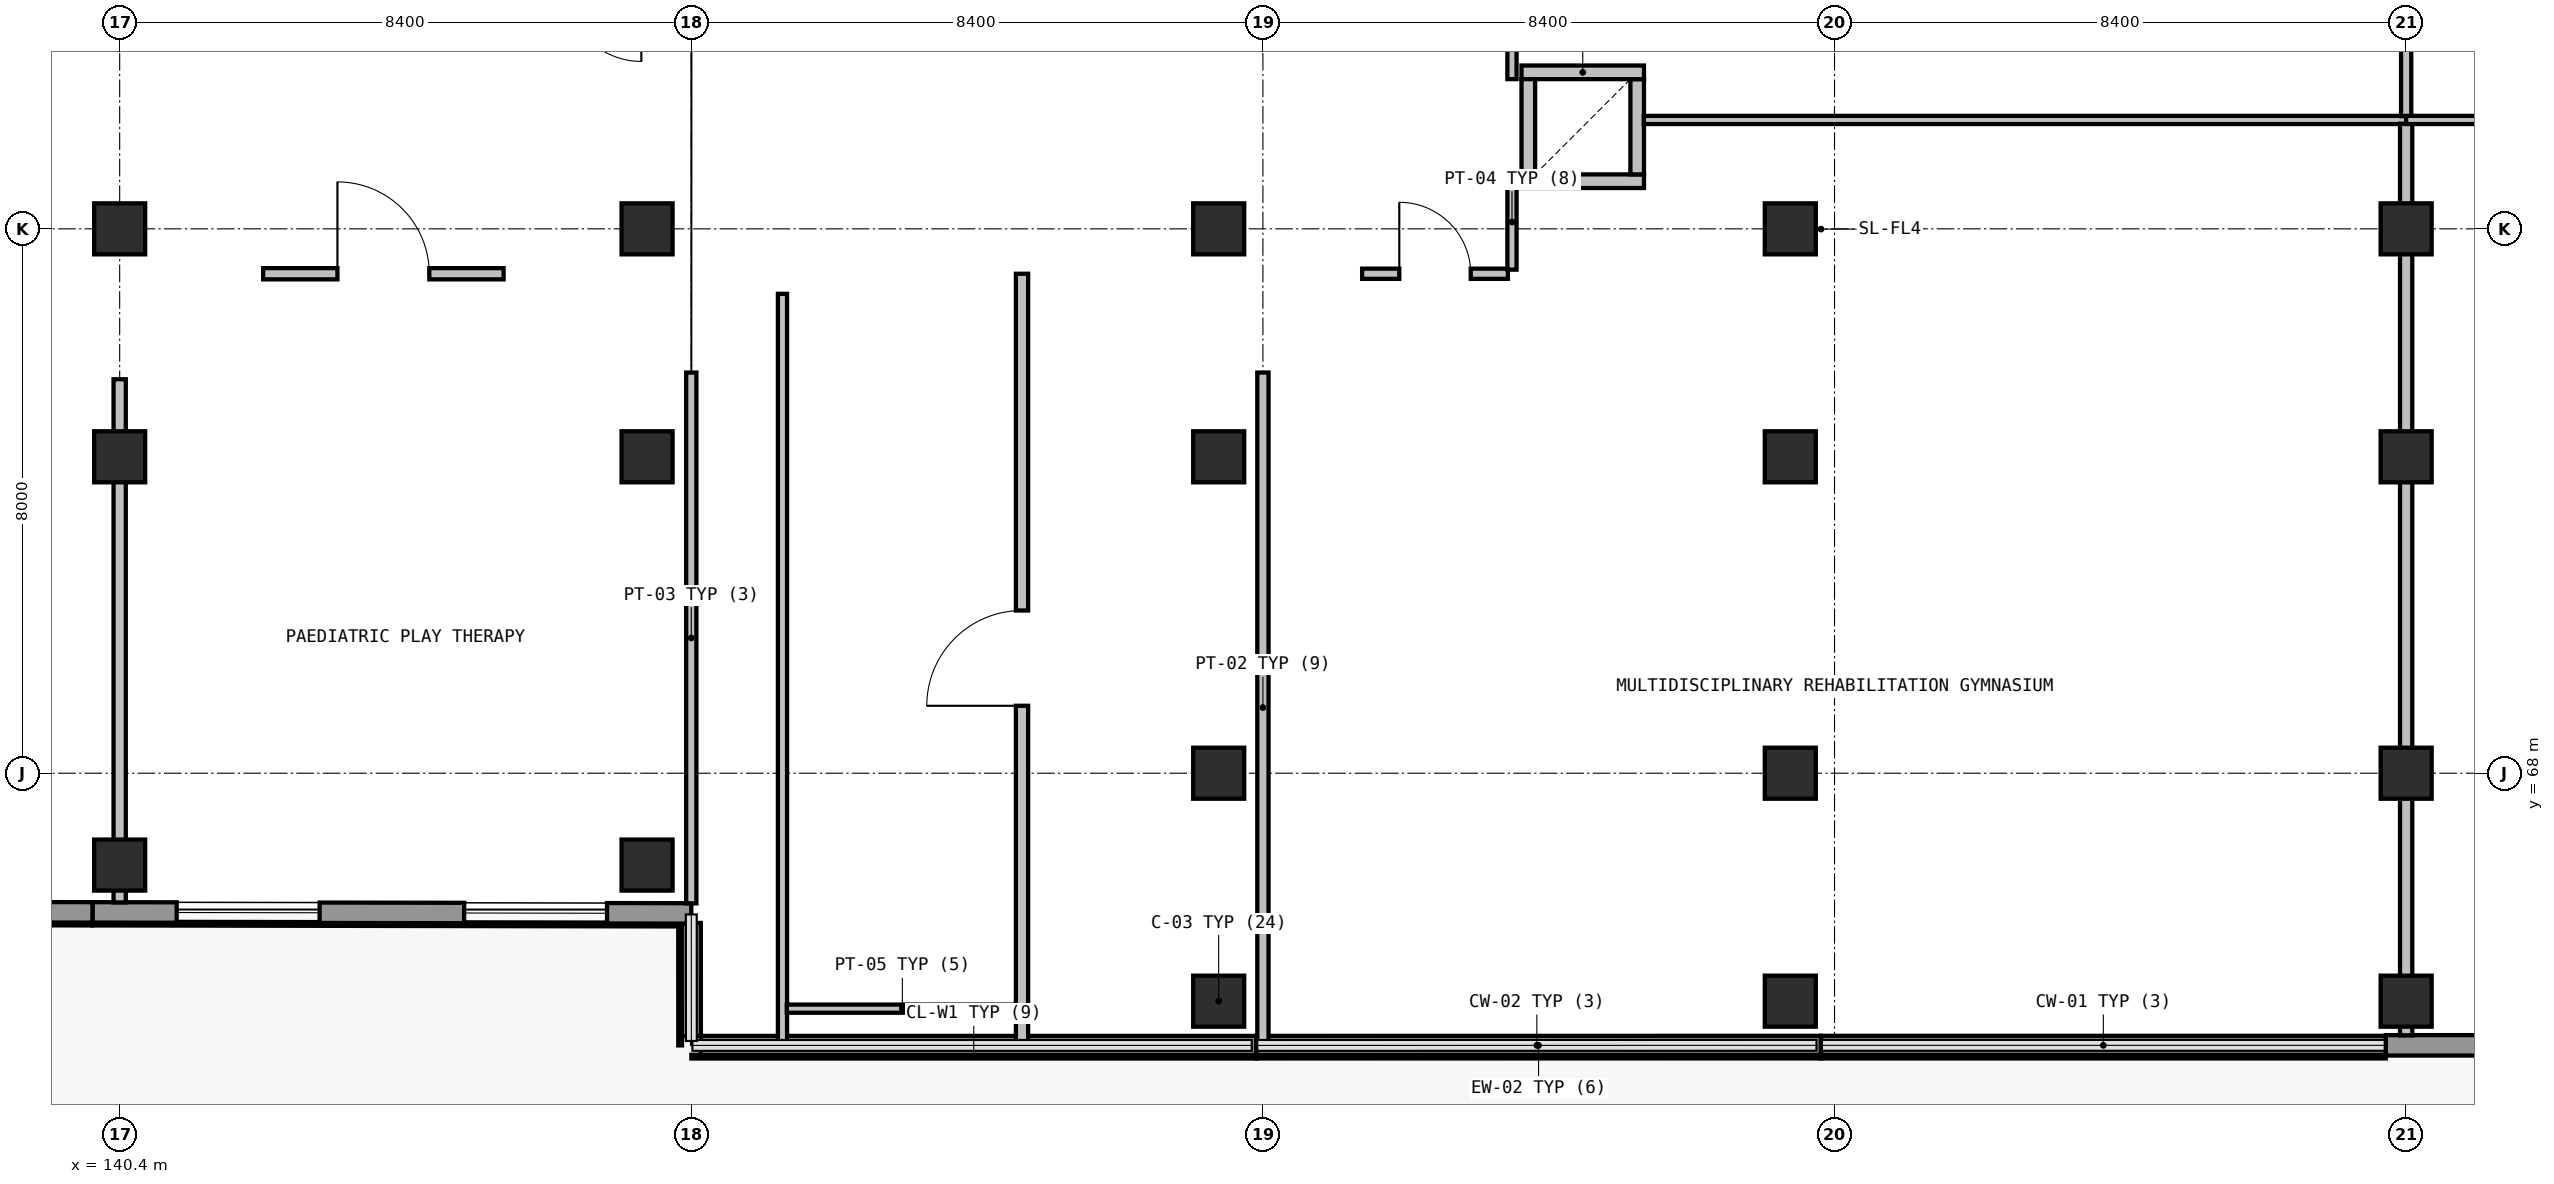
"""IFC4 building model, lengths in metres.
Left out: names, types, materials, properties, quantities, classifications, styles, units other than length and angle.
Written with IfcOpenShell. Run it as: python <this file> out.ifc"""

import sys

from ifc_helpers import new_model, si_unit, direction, frame, frame_2d, origin, origin_2d, place, context, subcontext, project, spatial, rectangle, extrude, element, fill, save


model = new_model("IFC4")
c1 = context("Model", 3, precision=1e-05, world=origin(), true_north=direction((0.0, 1.0)))
c2 = subcontext(c1, "Body", "Model", "MODEL_VIEW")
j1 = project(units=[si_unit("LENGTHUNIT", "METRE"), si_unit("PLANEANGLEUNIT", "RADIAN")], contexts=[c1])
p1 = place(None, origin())
s1 = spatial("IfcSite", under=j1, at=p1, CompositionType="ELEMENT")
p2 = place(p1, origin())
s2 = spatial("IfcBuilding", under=s1, at=p2, CompositionType="ELEMENT")
p3 = place(p2, frame((0.0, 0.0, 19.2)))
s3 = spatial("IfcBuildingStorey", under=s2, at=p3, CompositionType="ELEMENT", Elevation=19.2)
for number, where, z_axis, x_axis in (
    (1, (140.4, 66.65, 0.0), (0.0, 0.0, 1.0), (1.0, 0.0, 0.0)),
    (2, (140.4, 72.65, 0.0), (0.0, 0.0, 1.0), (1.0, 0.0, 0.0)),
    (3, (140.4, 76.0, 0.0), (0.0, 0.0, 1.0), (1.0, 0.0, 0.0)),
    (4, (148.15, 66.65, 0.0), (0.0, 0.0, 1.0), (1.0, 0.0, 0.0)),
    (5, (148.15, 72.65, 0.0), (0.0, 0.0, 1.0), (1.0, 0.0, 0.0)),
    (6, (148.15, 76.0, 0.0), (0.0, 0.0, 1.0), (1.0, 0.0, 0.0)),
):
    element("IfcColumn", number, at=place(p3, frame(where, z_axis=z_axis, x_axis=x_axis)), inside=s3, PredefinedType="COLUMN", context=c2, shape_type="SweptSolid", body=[
        extrude(rectangle(XDim=0.75, YDim=0.75, at=origin_2d()), origin(), (0.0, 0.0, 1.0), 3.75),
    ])
for number, where, z_axis, x_axis in (
    (7, (156.55, 64.65, 0.0), (0.0, 0.0, 1.0), (1.0, 0.0, 0.0)),
    (8, (156.55, 68.0, 0.0), (0.0, 0.0, 1.0), (1.0, 0.0, 0.0)),
    (9, (156.55, 72.65, 0.0), (0.0, 0.0, 1.0), (1.0, 0.0, 0.0)),
    (10, (156.55, 76.0, 0.0), (0.0, 0.0, 1.0), (1.0, 0.0, 0.0)),
    (11, (164.95, 64.65, 0.0), (0.0, 0.0, 1.0), (1.0, 0.0, 0.0)),
    (12, (164.95, 68.0, 0.0), (0.0, 0.0, 1.0), (1.0, 0.0, 0.0)),
    (13, (164.95, 72.65, 0.0), (0.0, 0.0, 1.0), (1.0, 0.0, 0.0)),
    (14, (164.95, 76.0, 0.0), (0.0, 0.0, 1.0), (1.0, 0.0, 0.0)),
    (15, (174.0, 64.65, 0.0), (0.0, 0.0, 1.0), (1.0, 0.0, 0.0)),
    (16, (174.0, 68.0, 0.0), (0.0, 0.0, 1.0), (1.0, 0.0, 0.0)),
    (17, (174.0, 72.65, 0.0), (0.0, 0.0, 1.0), (1.0, 0.0, 0.0)),
    (18, (174.0, 76.0, 0.0), (0.0, 0.0, 1.0), (1.0, 0.0, 0.0)),
):
    element("IfcColumn", number, at=place(p3, frame(where, z_axis=z_axis, x_axis=x_axis)), inside=s3, PredefinedType="COLUMN", context=c2, shape_type="SweptSolid", body=[
        extrude(rectangle(XDim=0.75, YDim=0.75, at=origin_2d()), origin(), (0.0, 0.0, 1.0), 4.05),
    ])
p4 = place(p3, frame((182.0, 64.001, 0.0), z_axis=(0.0, 0.0, 1.0), x_axis=(-1.0, 0.0, 0.0)))
e19 = element("IfcWall", 19, at=p4, inside=s3, PredefinedType="SOLIDWALL", context=c2, shape_type="SweptSolid", body=[
    extrude(rectangle(XDim=8.3, YDim=0.3, at=frame_2d((4.15, 0.0))), origin(), (0.0, 0.0, 1.0), 3.77),
])
p5 = place(p4, frame((3.25, 0.0, 0.0)))
e20 = element("IfcOpeningElement", 20, at=p5, cuts=e19, PredefinedType="OPENING", context=c2, shape_type="SweptSolid", body=[
    extrude(rectangle(XDim=1.8, YDim=2.2, at=frame_2d((0.9, 1.1))), frame((0.0, 0.16, 0.0), z_axis=(0.0, -1.0, 0.0), x_axis=(1.0, 0.0, 0.0)), (0.0, 0.0, 1.0), 0.32),
])
p6 = place(p3, frame((173.698, 64.001, 0.0), z_axis=(0.0, 0.0, 1.0), x_axis=(-1.0, 0.0, 0.0)))
e21 = element("IfcWall", 21, at=p6, inside=s3, PredefinedType="SOLIDWALL", context=c2, shape_type="SweptSolid", body=[
    extrude(rectangle(XDim=8.296, YDim=0.28, at=frame_2d((4.148, 0.0))), origin(), (0.0, 0.0, 1.0), 0.94),
])
p7 = place(p3, frame((165.398, 64.001, 0.0), z_axis=(0.0, 0.0, 1.0), x_axis=(-0.99999999307, -0.000117730162, 0.0)))
e22 = element("IfcWall", 22, at=p7, inside=s3, PredefinedType="SOLIDWALL", context=c2, shape_type="SweptSolid", body=[
    extrude(rectangle(XDim=8.295, YDim=0.28, at=frame_2d((4.147, 0.0))), origin(), (0.0, 0.0, 1.0), 0.94),
])
p8 = place(p3, frame((157.099, 64.0, 0.0), z_axis=(0.0, 0.0, 1.0), x_axis=(-1.0, 0.0, 0.0)))
e23 = element("IfcWall", 23, at=p8, inside=s3, PredefinedType="SOLIDWALL", context=c2, shape_type="SweptSolid", body=[
    extrude(rectangle(XDim=8.158, YDim=0.28, at=frame_2d((4.079, 0.0))), origin(), (0.0, 0.0, 1.0), 0.94),
])
p9 = place(p3, frame((148.801, 64.14, 0.0), z_axis=(0.0, 0.0, 1.0), x_axis=(-0.000588235192, 0.99999982699, 0.0)))
e24 = element("IfcWall", 24, at=p9, inside=s3, PredefinedType="SOLIDWALL", context=c2, shape_type="SweptSolid", body=[
    extrude(rectangle(XDim=1.66, YDim=0.28, at=frame_2d((0.83, 0.0))), origin(), (0.0, 0.0, 1.0), 0.94),
])
p10 = place(p3, frame((148.8, 65.94, 0.0), z_axis=(0.0, 0.0, 1.0), x_axis=(-0.999998520679, 0.001720069588, 0.0)))
e25 = element("IfcWall", 25, at=p10, inside=s3, PredefinedType="SOLIDWALL", context=c2, shape_type="SweptSolid", body=[
    extrude(rectangle(XDim=8.8, YDim=0.3, at=frame_2d((4.4, 0.0))), origin(), (0.0, 0.0, 1.0), 3.77),
])
p11 = place(p10, frame((1.238, 0.0, 0.96)))
e26 = element("IfcOpeningElement", 26, at=p11, cuts=e25, PredefinedType="OPENING", context=c2, shape_type="SweptSolid", body=[
    extrude(rectangle(XDim=2.1, YDim=1.8, at=frame_2d((1.05, 0.9))), frame((0.0, 0.16, 0.0), z_axis=(0.0, -1.0, 0.0), x_axis=(1.0, 0.0, 0.0)), (0.0, 0.0, 1.0), 0.32),
])
p12 = place(p10, frame((5.462, 0.0, 0.96)))
e27 = element("IfcOpeningElement", 27, at=p12, cuts=e25, PredefinedType="OPENING", context=c2, shape_type="SweptSolid", body=[
    extrude(rectangle(XDim=2.1, YDim=1.8, at=frame_2d((1.05, 0.9))), frame((0.0, 0.16, 0.0), z_axis=(0.0, -1.0, 0.0), x_axis=(1.0, 0.0, 0.0)), (0.0, 0.0, 1.0), 0.32),
])
p13 = place(p3, frame((140.0, 65.955, 0.0), z_axis=(0.0, 0.0, 1.0), x_axis=(-0.999998567696, 0.001692514432, 0.0)))
e28 = element("IfcWall", 28, at=p13, inside=s3, PredefinedType="SOLIDWALL", context=c2, shape_type="SweptSolid", body=[
    extrude(rectangle(XDim=8.799, YDim=0.3, at=frame_2d((4.399, 0.0))), origin(), (0.0, 0.0, 1.0), 3.77),
])
p14 = place(p13, frame((1.238, 0.0, 0.96)))
e29 = element("IfcOpeningElement", 29, at=p14, cuts=e28, PredefinedType="OPENING", context=c2, shape_type="SweptSolid", body=[
    extrude(rectangle(XDim=2.1, YDim=1.8, at=frame_2d((1.05, 0.9))), frame((0.0, 0.16, 0.0), z_axis=(0.0, -1.0, 0.0), x_axis=(1.0, 0.0, 0.0)), (0.0, 0.0, 1.0), 0.32),
])
p15 = place(p13, frame((5.461, 0.0, 0.96)))
e30 = element("IfcOpeningElement", 30, at=p15, cuts=e28, PredefinedType="OPENING", context=c2, shape_type="SweptSolid", body=[
    extrude(rectangle(XDim=2.1, YDim=1.8, at=frame_2d((1.05, 0.9))), frame((0.0, 0.16, 0.0), z_axis=(0.0, -1.0, 0.0), x_axis=(1.0, 0.0, 0.0)), (0.0, 0.0, 1.0), 0.32),
])
p16 = place(p3, frame((161.0, 76.7, 0.0), z_axis=(0.0, 0.0, 1.0), x_axis=(1.0, 0.0, 0.0)))
e31 = element("IfcWall", 31, at=p16, inside=s3, PredefinedType="SOLIDWALL", context=c2, shape_type="SweptSolid", body=[
    extrude(rectangle(XDim=1.8, YDim=0.2, at=frame_2d((0.9, 0.0))), origin(), (0.0, 0.0, 1.0), 3.77),
])
p17 = place(p3, frame((162.7, 76.8, 0.0), z_axis=(0.0, 0.0, 1.0), x_axis=(0.0, 1.0, 0.0)))
e32 = element("IfcWall", 32, at=p17, inside=s3, PredefinedType="SOLIDWALL", context=c2, shape_type="SweptSolid", body=[
    extrude(rectangle(XDim=1.4, YDim=0.2, at=frame_2d((0.7, 0.0))), origin(), (0.0, 0.0, 1.0), 3.77),
])
p18 = place(p3, frame((162.8, 78.3, 0.0), z_axis=(0.0, 0.0, 1.0), x_axis=(-1.0, 0.0, 0.0)))
e33 = element("IfcWall", 33, at=p18, inside=s3, PredefinedType="SOLIDWALL", context=c2, shape_type="SweptSolid", body=[
    extrude(rectangle(XDim=1.8, YDim=0.2, at=frame_2d((0.9, 0.0))), origin(), (0.0, 0.0, 1.0), 3.77),
])
p19 = place(p3, frame((161.1, 78.2, 0.0), z_axis=(0.0, 0.0, 1.0), x_axis=(0.0, -1.0, 0.0)))
e34 = element("IfcWall", 34, at=p19, inside=s3, PredefinedType="SOLIDWALL", context=c2, shape_type="SweptSolid", body=[
    extrude(rectangle(XDim=1.4, YDim=0.2, at=frame_2d((0.7, 0.0))), origin(), (0.0, 0.0, 1.0), 3.77),
])
p20 = place(p3, frame((140.4, 73.79, 0.0), z_axis=(0.0, 0.0, 1.0), x_axis=(0.0, -1.0, 0.0)))
e35 = element("IfcWall", 35, at=p20, inside=s3, PredefinedType="PARTITIONING", context=c2, shape_type="SweptSolid", body=[
    extrude(rectangle(XDim=7.689, YDim=0.18, at=frame_2d((3.844, 0.0))), origin(), (0.0, 0.0, 1.0), 3.1),
])
p21 = place(p3, frame((142.508, 75.34, 0.0), z_axis=(0.0, 0.0, 1.0), x_axis=(1.0, 0.0, 0.0)))
e36 = element("IfcWall", 36, at=p21, inside=s3, PredefinedType="PARTITIONING", context=c2, shape_type="SweptSolid", body=[
    extrude(rectangle(XDim=3.534, YDim=0.165, at=frame_2d((1.767, 0.0))), origin(), (0.0, 0.0, 1.0), 3.77),
])
p22 = place(p21, frame((1.092, 0.0, 0.0)))
e37 = element("IfcOpeningElement", 37, at=p22, cuts=e36, PredefinedType="OPENING", context=c2, shape_type="SweptSolid", body=[
    extrude(rectangle(XDim=1.35, YDim=2.15, at=frame_2d((0.675, 1.075))), frame((0.0, 0.093, 0.0), z_axis=(0.0, -1.0, 0.0), x_axis=(1.0, 0.0, 0.0)), (0.0, 0.0, 1.0), 0.185),
])
p23 = place(p3, frame((148.8, 73.888, 0.0), z_axis=(0.0, 0.0, 1.0), x_axis=(0.0, -1.0, 0.0)))
e38 = element("IfcWall", 38, at=p23, inside=s3, PredefinedType="PARTITIONING", context=c2, shape_type="SweptSolid", body=[
    extrude(rectangle(XDim=7.801, YDim=0.15, at=frame_2d((3.9, 0.0))), origin(), (0.0, 0.0, 1.0), 3.77),
])
p24 = place(p3, frame((150.14, 75.045, 0.0), z_axis=(0.0, 0.0, 1.0), x_axis=(0.0, -1.0, 0.0)))
e39 = element("IfcWall", 39, at=p24, inside=s3, PredefinedType="PARTITIONING", context=c2, shape_type="SweptSolid", body=[
    extrude(rectangle(XDim=11.003, YDim=0.135, at=frame_2d((5.501, 0.0))), origin(), (0.0, 0.0, 1.0), 3.77),
])
p25 = place(p3, frame((150.203, 64.54, 0.0), z_axis=(0.0, 0.0, 1.0), x_axis=(1.0, 0.0, 0.0)))
e40 = element("IfcWall", 40, at=p25, inside=s3, PredefinedType="PARTITIONING", context=c2, shape_type="SweptSolid", body=[
    extrude(rectangle(XDim=3.397, YDim=0.12, at=frame_2d((1.699, 0.0))), origin(), (0.0, 0.0, 1.0), 3.77),
])
p26 = place(p3, frame((153.66, 64.042, 0.0), z_axis=(0.0, 0.0, 1.0), x_axis=(0.0, 1.0, 0.0)))
e41 = element("IfcWall", 41, at=p26, inside=s3, PredefinedType="PARTITIONING", context=c2, shape_type="SweptSolid", body=[
    extrude(rectangle(XDim=11.298, YDim=0.18, at=frame_2d((5.649, 0.0))), origin(), (0.0, 0.0, 1.0), 3.77),
])
p27 = place(p26, frame((4.949, 0.0, 0.0)))
e42 = element("IfcOpeningElement", 42, at=p27, cuts=e41, PredefinedType="OPENING", context=c2, shape_type="SweptSolid", body=[
    extrude(rectangle(XDim=1.4, YDim=2.15, at=frame_2d((0.7, 1.075))), frame((0.0, 0.1, 0.0), z_axis=(0.0, -1.0, 0.0), x_axis=(1.0, 0.0, 0.0)), (0.0, 0.0, 1.0), 0.2),
])
p28 = place(p3, frame((157.2, 73.888, 0.0), z_axis=(0.0, 0.0, 1.0), x_axis=(0.0, -1.0, 0.0)))
e43 = element("IfcWall", 43, at=p28, inside=s3, PredefinedType="PARTITIONING", context=c2, shape_type="SweptSolid", body=[
    extrude(rectangle(XDim=9.846, YDim=0.165, at=frame_2d((4.923, 0.0))), origin(), (0.0, 0.0, 1.0), 3.77),
])
p29 = place(p3, frame((158.658, 75.34, 0.0), z_axis=(0.0, 0.0, 1.0), x_axis=(1.0, 0.0, 0.0)))
e44 = element("IfcWall", 44, at=p29, inside=s3, PredefinedType="PARTITIONING", context=c2, shape_type="SweptSolid", body=[
    extrude(rectangle(XDim=2.142, YDim=0.15, at=frame_2d((1.071, 0.0))), origin(), (0.0, 0.0, 1.0), 3.77),
])
p30 = place(p29, frame((0.546, 0.0, 0.0)))
e45 = element("IfcOpeningElement", 45, at=p30, cuts=e44, PredefinedType="OPENING", context=c2, shape_type="SweptSolid", body=[
    extrude(rectangle(XDim=1.05, YDim=2.15, at=frame_2d((0.525, 1.075))), frame((0.0, 0.085, 0.0), z_axis=(0.0, -1.0, 0.0), x_axis=(1.0, 0.0, 0.0)), (0.0, 0.0, 1.0), 0.17),
])
p31 = place(p3, frame((160.86, 75.4, 0.0), z_axis=(0.0, 0.0, 1.0), x_axis=(0.0, 1.0, 0.0)))
e46 = element("IfcWall", 46, at=p31, inside=s3, PredefinedType="PARTITIONING", context=c2, shape_type="SweptSolid", body=[
    extrude(rectangle(XDim=1.4, YDim=0.135, at=frame_2d((0.7, 0.0))), origin(), (0.0, 0.0, 1.0), 3.77),
])
p32 = place(p3, frame((162.797, 77.6, 0.0), z_axis=(0.0, 0.0, 1.0), x_axis=(1.0, 0.0, 0.0)))
e47 = element("IfcWall", 47, at=p32, inside=s3, PredefinedType="PARTITIONING", context=c2, shape_type="SweptSolid", body=[
    extrude(rectangle(XDim=11.203, YDim=0.12, at=frame_2d((5.602, 0.0))), origin(), (0.0, 0.0, 1.0), 3.77),
])
p33 = place(p3, frame((174.0, 77.544, 0.0), z_axis=(0.0, 0.0, 1.0), x_axis=(0.0, -1.0, 0.0)))
e48 = element("IfcWall", 48, at=p33, inside=s3, PredefinedType="PARTITIONING", context=c2, shape_type="SweptSolid", body=[
    extrude(rectangle(XDim=13.396, YDim=0.18, at=frame_2d((6.698, 0.0))), origin(), (0.0, 0.0, 1.0), 3.12),
])
p34 = place(p3, frame((174.0, 105.361, 0.0), z_axis=(0.0, 0.0, 1.0), x_axis=(0.0, -1.0, 0.0)))
e49 = element("IfcWall", 49, at=p34, inside=s3, PredefinedType="PARTITIONING", context=c2, shape_type="SweptSolid", body=[
    extrude(rectangle(XDim=27.705, YDim=0.15, at=frame_2d((13.853, 0.0))), origin(), (0.0, 0.0, 1.0), 3.12),
])
p35 = place(p3, frame((160.86, 78.2, 0.0), z_axis=(0.0, 0.0, 1.0), x_axis=(0.0, 1.0, 0.0)))
e50 = element("IfcWall", 50, at=p35, inside=s3, PredefinedType="PARTITIONING", context=c2, shape_type="SweptSolid", body=[
    extrude(rectangle(XDim=1.3, YDim=0.135, at=frame_2d((0.65, 0.0))), origin(), (0.0, 0.0, 1.0), 3.77),
])
p36 = place(p3, frame((181.958, 77.6, 0.0), z_axis=(0.0, 0.0, 1.0), x_axis=(-1.0, 0.0, 0.0)))
e51 = element("IfcWall", 51, at=p36, inside=s3, PredefinedType="PARTITIONING", context=c2, shape_type="SweptSolid", body=[
    extrude(rectangle(XDim=7.958, YDim=0.12, at=frame_2d((3.979, 0.0))), origin(), (0.0, 0.0, 1.0), 3.77),
])
p37 = place(p11, origin())
e52 = element("IfcWindow", 52, at=p37, inside=s3, PartitioningType="SINGLE_PANEL", PredefinedType="WINDOW", context=c2, shape_type="SweptSolid", body=[
    extrude(rectangle(XDim=2.1, YDim=1.8, at=frame_2d((1.05, 0.9))), frame((0.0, 0.03, 0.0), z_axis=(0.0, -1.0, 0.0), x_axis=(1.0, 0.0, 0.0)), (0.0, 0.0, 1.0), 0.06),
])
fill(e26, e52)
p38 = place(p12, origin())
e53 = element("IfcWindow", 53, at=p38, inside=s3, PartitioningType="SINGLE_PANEL", PredefinedType="WINDOW", context=c2, shape_type="SweptSolid", body=[
    extrude(rectangle(XDim=2.1, YDim=1.8, at=frame_2d((1.05, 0.9))), frame((0.0, 0.03, 0.0), z_axis=(0.0, -1.0, 0.0), x_axis=(1.0, 0.0, 0.0)), (0.0, 0.0, 1.0), 0.06),
])
fill(e27, e53)
p39 = place(p22, origin())
e54 = element("IfcDoor", 54, at=p39, inside=s3, OperationType="SINGLE_SWING_RIGHT", PredefinedType="DOOR", context=c2, shape_type="SweptSolid", body=[
    extrude(rectangle(XDim=1.35, YDim=2.15, at=frame_2d((0.675, 1.075))), frame((0.0, 0.025, 0.0), z_axis=(0.0, -1.0, 0.0), x_axis=(1.0, 0.0, 0.0)), (0.0, 0.0, 1.0), 0.05),
])
fill(e37, e54)
p40 = place(p27, origin())
e55 = element("IfcDoor", 55, at=p40, inside=s3, OperationType="SINGLE_SWING_LEFT", PredefinedType="DOOR", context=c2, shape_type="SweptSolid", body=[
    extrude(rectangle(XDim=1.4, YDim=2.15, at=frame_2d((0.7, 1.075))), frame((0.0, 0.025, 0.0), z_axis=(0.0, -1.0, 0.0), x_axis=(1.0, 0.0, 0.0)), (0.0, 0.0, 1.0), 0.05),
])
fill(e42, e55)
p41 = place(p30, origin())
e56 = element("IfcDoor", 56, at=p41, inside=s3, OperationType="SINGLE_SWING_RIGHT", PredefinedType="DOOR", context=c2, shape_type="SweptSolid", body=[
    extrude(rectangle(XDim=1.05, YDim=2.15, at=frame_2d((0.525, 1.075))), frame((0.0, 0.025, 0.0), z_axis=(0.0, -1.0, 0.0), x_axis=(1.0, 0.0, 0.0)), (0.0, 0.0, 1.0), 0.05),
])
fill(e45, e56)
save(model, sys.argv[1])
